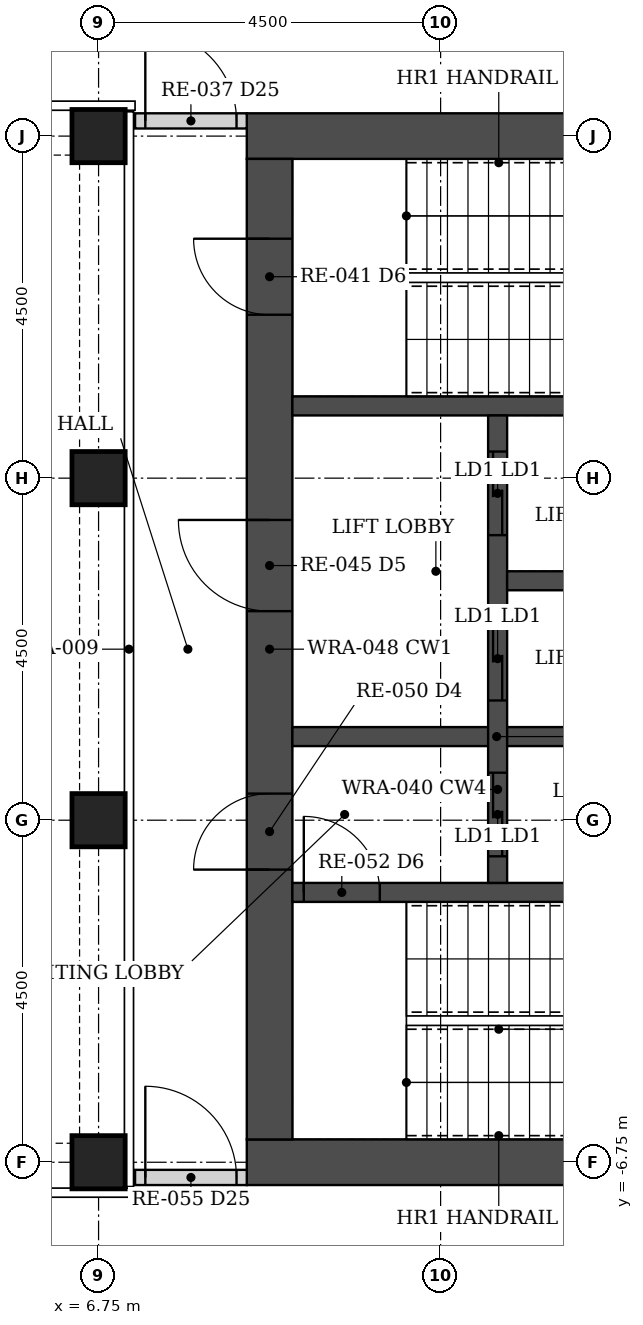
"""IFC4 building model, lengths in metres.
Left out: names, types, materials, properties, quantities, classifications, styles, units other than length and angle.
Written with IfcOpenShell. Run it as: python <this file> out.ifc"""

import sys

from ifc_helpers import new_model, si_unit, direction, frame, frame_2d, origin, origin_2d, place, context, subcontext, project, spatial, rectangle, hollow_rectangle, extrude, element, fill, save


model = new_model("IFC4")
c1 = context("Model", 3, precision=1e-05, world=origin(), true_north=direction((0.0, 1.0)))
c2 = subcontext(c1, "Body", "Model", "MODEL_VIEW")
j1 = project(units=[si_unit("LENGTHUNIT", "METRE"), si_unit("PLANEANGLEUNIT", "RADIAN")], contexts=[c1])
p1 = place(None, origin())
s1 = spatial("IfcSite", under=j1, at=p1, CompositionType="ELEMENT")
p2 = place(p1, origin())
s2 = spatial("IfcBuilding", under=s1, at=p2, CompositionType="ELEMENT")
p3 = place(p2, frame((0.0, 0.0, 68.5)))
s3 = spatial("IfcBuildingStorey", under=s2, at=p3, CompositionType="ELEMENT", Elevation=68.5)
for number, where, z_axis, x_axis in (
    (1, (6.75, -6.75, 0.0), (0.0, 0.0, 1.0), (1.0, 0.0, 0.0)),
    (2, (6.75, -2.25, 0.0), (0.0, 0.0, 1.0), (1.0, 0.0, 0.0)),
    (3, (6.75, 2.25, 0.0), (0.0, 0.0, 1.0), (1.0, 0.0, 0.0)),
    (4, (6.75, 6.75, 0.0), (0.0, 0.0, 1.0), (1.0, 0.0, 0.0)),
):
    element("IfcColumn", number, at=place(p3, frame(where, z_axis=z_axis, x_axis=x_axis)), inside=s3, PredefinedType="COLUMN", context=c2, shape_type="SweptSolid", body=[
        extrude(hollow_rectangle(XDim=0.7, YDim=0.7, WallThickness=0.06, at=origin_2d()), origin(), (0.0, 0.0, 1.0), 3.5),
    ])
for number, where, z_axis, x_axis in (
    (5, (8.7, -6.75, 0.0), (0.0, 0.0, 1.0), (1.0, 0.0, 0.0)),
    (6, (8.7, 6.75, 0.0), (0.0, 0.0, 1.0), (1.0, 0.0, 0.0)),
):
    element("IfcWall", number, at=place(p3, frame(where, z_axis=z_axis, x_axis=x_axis)), inside=s3, PredefinedType="SHEAR", context=c2, shape_type="SweptSolid", body=[
        extrude(rectangle(XDim=9.6, YDim=0.6, at=frame_2d((4.8, 0.0))), origin(), (0.0, 0.0, 1.0), 3.5),
    ])
p4 = place(p3, frame((9.0, -6.45, 0.0), z_axis=(0.0, 0.0, 1.0), x_axis=(0.0, 1.0, 0.0)))
e7 = element("IfcWall", 7, at=p4, inside=s3, PredefinedType="SHEAR", context=c2, shape_type="SweptSolid", body=[
    extrude(rectangle(XDim=12.9, YDim=0.6, at=frame_2d((6.45, 0.0))), origin(), (0.0, 0.0, 1.0), 3.5),
])
p5 = place(p4, frame((3.55, 0.0, 0.0)))
e8 = element("IfcOpeningElement", 8, at=p5, cuts=e7, PredefinedType="OPENING", context=c2, shape_type="SweptSolid", body=[
    extrude(rectangle(XDim=1.0, YDim=2.1, at=frame_2d((0.5, 1.05))), frame((0.0, 0.31, 0.0), z_axis=(0.0, -1.0, 0.0), x_axis=(1.0, 0.0, 0.0)), (0.0, 0.0, 1.0), 0.62),
])
p6 = place(p4, frame((6.95, 0.0, 0.0)))
e9 = element("IfcOpeningElement", 9, at=p6, cuts=e7, PredefinedType="OPENING", context=c2, shape_type="SweptSolid", body=[
    extrude(rectangle(XDim=1.2, YDim=2.1, at=frame_2d((0.6, 1.05))), frame((0.0, 0.31, 0.0), z_axis=(0.0, -1.0, 0.0), x_axis=(1.0, 0.0, 0.0)), (0.0, 0.0, 1.0), 0.62),
])
p7 = place(p4, frame((10.85, 0.0, 0.0)))
e10 = element("IfcOpeningElement", 10, at=p7, cuts=e7, PredefinedType="OPENING", context=c2, shape_type="SweptSolid", body=[
    extrude(rectangle(XDim=1.0, YDim=2.1, at=frame_2d((0.5, 1.05))), frame((0.0, 0.31, 0.0), z_axis=(0.0, -1.0, 0.0), x_axis=(1.0, 0.0, 0.0)), (0.0, 0.0, 1.0), 0.62),
])
p8 = place(p3, frame((9.3, -3.2, 0.0), z_axis=(0.0, 0.0, 1.0), x_axis=(1.0, 0.0, 0.0)))
e11 = element("IfcWall", 11, at=p8, inside=s3, PredefinedType="SHEAR", context=c2, shape_type="SweptSolid", body=[
    extrude(rectangle(XDim=8.4, YDim=0.25, at=frame_2d((4.2, 0.0))), origin(), (0.0, 0.0, 1.0), 3.5),
])
p9 = place(p8, frame((0.15, 0.0, 0.0)))
e12 = element("IfcOpeningElement", 12, at=p9, cuts=e11, PredefinedType="OPENING", context=c2, shape_type="SweptSolid", body=[
    extrude(rectangle(XDim=1.0, YDim=2.1, at=frame_2d((0.5, 1.05))), frame((0.0, 0.135, 0.0), z_axis=(0.0, -1.0, 0.0), x_axis=(1.0, 0.0, 0.0)), (0.0, 0.0, 1.0), 0.27),
])
p10 = place(p3, frame((9.3, 3.2, 0.0), z_axis=(0.0, 0.0, 1.0), x_axis=(1.0, 0.0, 0.0)))
e13 = element("IfcWall", 13, at=p10, inside=s3, PredefinedType="SHEAR", context=c2, shape_type="SweptSolid", body=[
    extrude(rectangle(XDim=8.4, YDim=0.25, at=frame_2d((4.2, 0.0))), origin(), (0.0, 0.0, 1.0), 3.5),
])
p11 = place(p3, frame((9.3, -1.15, 0.0), z_axis=(0.0, 0.0, 1.0), x_axis=(1.0, 0.0, 0.0)))
e14 = element("IfcWall", 14, at=p11, inside=s3, PredefinedType="SHEAR", context=c2, shape_type="SweptSolid", body=[
    extrude(rectangle(XDim=5.375, YDim=0.25, at=frame_2d((2.688, 0.0))), origin(), (0.0, 0.0, 1.0), 3.5),
])
p12 = place(p3, frame((12.0, -3.075, 0.0), z_axis=(0.0, 0.0, 1.0), x_axis=(0.0, 1.0, 0.0)))
e15 = element("IfcWall", 15, at=p12, inside=s3, PredefinedType="SHEAR", context=c2, shape_type="SweptSolid", body=[
    extrude(rectangle(XDim=6.15, YDim=0.25, at=frame_2d((3.075, 0.0))), origin(), (0.0, 0.0, 1.0), 3.5),
])
p13 = place(p12, frame((0.35, 0.0, 0.0)))
e16 = element("IfcOpeningElement", 16, at=p13, cuts=e15, PredefinedType="OPENING", context=c2, shape_type="SweptSolid", body=[
    extrude(rectangle(XDim=1.1, YDim=2.1, at=frame_2d((0.55, 1.05))), frame((0.0, 0.135, 0.0), z_axis=(0.0, -1.0, 0.0), x_axis=(1.0, 0.0, 0.0)), (0.0, 0.0, 1.0), 0.27),
])
p14 = place(p12, frame((2.4, 0.0, 0.0)))
e17 = element("IfcOpeningElement", 17, at=p14, cuts=e15, PredefinedType="OPENING", context=c2, shape_type="SweptSolid", body=[
    extrude(rectangle(XDim=1.1, YDim=2.1, at=frame_2d((0.55, 1.05))), frame((0.0, 0.135, 0.0), z_axis=(0.0, -1.0, 0.0), x_axis=(1.0, 0.0, 0.0)), (0.0, 0.0, 1.0), 0.27),
])
p15 = place(p12, frame((4.575, 0.0, 0.0)))
e18 = element("IfcOpeningElement", 18, at=p15, cuts=e15, PredefinedType="OPENING", context=c2, shape_type="SweptSolid", body=[
    extrude(rectangle(XDim=1.1, YDim=2.1, at=frame_2d((0.55, 1.05))), frame((0.0, 0.135, 0.0), z_axis=(0.0, -1.0, 0.0), x_axis=(1.0, 0.0, 0.0)), (0.0, 0.0, 1.0), 0.27),
])
p16 = place(p3, frame((12.125, 0.9, 0.0), z_axis=(0.0, 0.0, 1.0), x_axis=(1.0, 0.0, 0.0)))
e19 = element("IfcWall", 19, at=p16, inside=s3, PredefinedType="SHEAR", context=c2, shape_type="SweptSolid", body=[
    extrude(rectangle(XDim=2.55, YDim=0.25, at=frame_2d((1.275, 0.0))), origin(), (0.0, 0.0, 1.0), 3.5),
])
p17 = place(p3, frame((7.23, 6.95, 0.0), z_axis=(0.0, 0.0, 1.0), x_axis=(1.0, 0.0, 0.0)))
e20 = element("IfcWall", 20, at=p17, inside=s3, PredefinedType="PARTITIONING", context=c2, shape_type="SweptSolid", body=[
    extrude(rectangle(XDim=1.47, YDim=0.2, at=frame_2d((0.735, 0.0))), origin(), (0.0, 0.0, 1.0), 2.373),
])
p18 = place(p17, frame((0.135, 0.0, 0.0)))
e21 = element("IfcOpeningElement", 21, at=p18, cuts=e20, PredefinedType="OPENING", context=c2, shape_type="SweptSolid", body=[
    extrude(rectangle(XDim=1.2, YDim=2.1, at=frame_2d((0.6, 1.05))), frame((0.0, 0.11, 0.0), z_axis=(0.0, -1.0, 0.0), x_axis=(1.0, 0.0, 0.0)), (0.0, 0.0, 1.0), 0.22),
])
p19 = place(p3, frame((7.23, -6.95, 0.0), z_axis=(0.0, 0.0, 1.0), x_axis=(1.0, 0.0, 0.0)))
e22 = element("IfcWall", 22, at=p19, inside=s3, PredefinedType="PARTITIONING", context=c2, shape_type="SweptSolid", body=[
    extrude(rectangle(XDim=1.47, YDim=0.2, at=frame_2d((0.735, 0.0))), origin(), (0.0, 0.0, 1.0), 2.373),
])
p20 = place(p19, frame((0.135, 0.0, 0.0)))
e23 = element("IfcOpeningElement", 23, at=p20, cuts=e22, PredefinedType="OPENING", context=c2, shape_type="SweptSolid", body=[
    extrude(rectangle(XDim=1.2, YDim=2.1, at=frame_2d((0.6, 1.05))), frame((0.0, 0.11, 0.0), z_axis=(0.0, -1.0, 0.0), x_axis=(1.0, 0.0, 0.0)), (0.0, 0.0, 1.0), 0.22),
])
p21 = place(p18, origin())
e24 = element("IfcDoor", 24, at=p21, inside=s3, OperationType="DOUBLE_DOOR_DOUBLE_SWING", PredefinedType="DOOR", context=c2, shape_type="SweptSolid", body=[
    extrude(rectangle(XDim=1.2, YDim=2.1, at=frame_2d((0.6, 1.05))), frame((0.0, 0.025, 0.0), z_axis=(0.0, -1.0, 0.0), x_axis=(1.0, 0.0, 0.0)), (0.0, 0.0, 1.0), 0.05),
])
fill(e21, e24)
p22 = place(p20, origin())
e25 = element("IfcDoor", 25, at=p22, inside=s3, OperationType="DOUBLE_DOOR_DOUBLE_SWING", PredefinedType="DOOR", context=c2, shape_type="SweptSolid", body=[
    extrude(rectangle(XDim=1.2, YDim=2.1, at=frame_2d((0.6, 1.05))), frame((0.0, 0.025, 0.0), z_axis=(0.0, -1.0, 0.0), x_axis=(1.0, 0.0, 0.0)), (0.0, 0.0, 1.0), 0.05),
])
fill(e23, e25)
p23 = place(p5, origin())
e26 = element("IfcDoor", 26, at=p23, inside=s3, OperationType="SINGLE_SWING_LEFT", PredefinedType="DOOR", context=c2, shape_type="SweptSolid", body=[
    extrude(rectangle(XDim=1.0, YDim=2.1, at=frame_2d((0.5, 1.05))), frame((0.0, 0.025, 0.0), z_axis=(0.0, -1.0, 0.0), x_axis=(1.0, 0.0, 0.0)), (0.0, 0.0, 1.0), 0.05),
])
fill(e8, e26)
p24 = place(p9, origin())
e27 = element("IfcDoor", 27, at=p24, inside=s3, OperationType="SINGLE_SWING_LEFT", PredefinedType="DOOR", context=c2, shape_type="SweptSolid", body=[
    extrude(rectangle(XDim=1.0, YDim=2.1, at=frame_2d((0.5, 1.05))), frame((0.0, 0.025, 0.0), z_axis=(0.0, -1.0, 0.0), x_axis=(1.0, 0.0, 0.0)), (0.0, 0.0, 1.0), 0.05),
])
fill(e12, e27)
p25 = place(p6, origin())
e28 = element("IfcDoor", 28, at=p25, inside=s3, OperationType="SINGLE_SWING_RIGHT", PredefinedType="DOOR", context=c2, shape_type="SweptSolid", body=[
    extrude(rectangle(XDim=1.2, YDim=2.1, at=frame_2d((0.6, 1.05))), frame((0.0, 0.025, 0.0), z_axis=(0.0, -1.0, 0.0), x_axis=(1.0, 0.0, 0.0)), (0.0, 0.0, 1.0), 0.05),
])
fill(e9, e28)
p26 = place(p7, origin())
e29 = element("IfcDoor", 29, at=p26, inside=s3, OperationType="SINGLE_SWING_RIGHT", PredefinedType="DOOR", context=c2, shape_type="SweptSolid", body=[
    extrude(rectangle(XDim=1.0, YDim=2.1, at=frame_2d((0.5, 1.05))), frame((0.0, 0.025, 0.0), z_axis=(0.0, -1.0, 0.0), x_axis=(1.0, 0.0, 0.0)), (0.0, 0.0, 1.0), 0.05),
])
fill(e10, e29)
p27 = place(p13, origin())
e30 = element("IfcDoor", 30, at=p27, inside=s3, OperationType="DOUBLE_DOOR_SLIDING", PredefinedType="DOOR", context=c2, shape_type="SweptSolid", body=[
    extrude(rectangle(XDim=1.1, YDim=2.1, at=frame_2d((0.55, 1.05))), frame((0.0, 0.025, 0.0), z_axis=(0.0, -1.0, 0.0), x_axis=(1.0, 0.0, 0.0)), (0.0, 0.0, 1.0), 0.05),
])
fill(e16, e30)
p28 = place(p14, origin())
e31 = element("IfcDoor", 31, at=p28, inside=s3, OperationType="DOUBLE_DOOR_SLIDING", PredefinedType="DOOR", context=c2, shape_type="SweptSolid", body=[
    extrude(rectangle(XDim=1.1, YDim=2.1, at=frame_2d((0.55, 1.05))), frame((0.0, 0.025, 0.0), z_axis=(0.0, -1.0, 0.0), x_axis=(1.0, 0.0, 0.0)), (0.0, 0.0, 1.0), 0.05),
])
fill(e17, e31)
p29 = place(p15, origin())
e32 = element("IfcDoor", 32, at=p29, inside=s3, OperationType="DOUBLE_DOOR_SLIDING", PredefinedType="DOOR", context=c2, shape_type="SweptSolid", body=[
    extrude(rectangle(XDim=1.1, YDim=2.1, at=frame_2d((0.55, 1.05))), frame((0.0, 0.025, 0.0), z_axis=(0.0, -1.0, 0.0), x_axis=(1.0, 0.0, 0.0)), (0.0, 0.0, 1.0), 0.05),
])
fill(e18, e32)
save(model, sys.argv[1])
